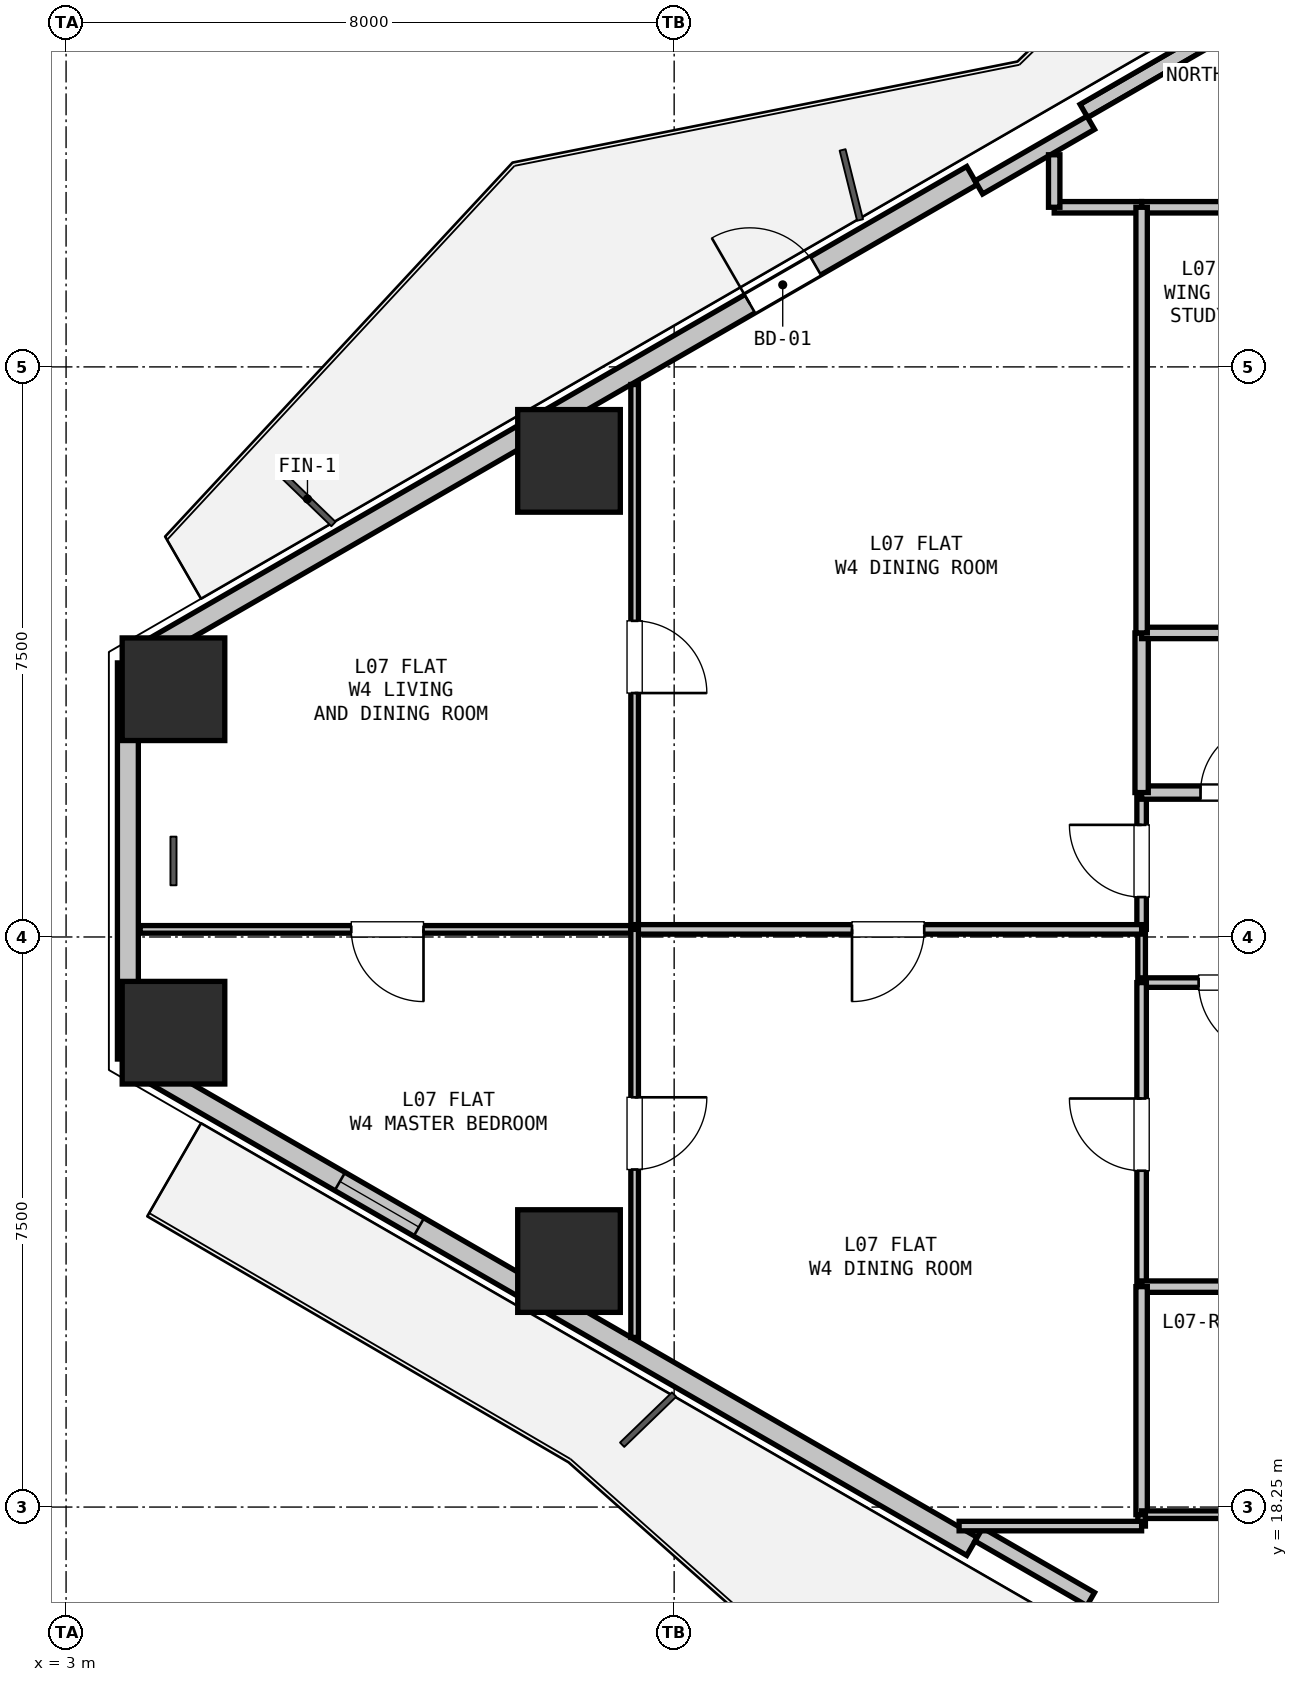
"""IFC4 building model, lengths in metres.
Left out: names, types, materials, properties, quantities, classifications, styles, units other than length and angle.
Written with IfcOpenShell. Run it as: python <this file> out.ifc"""

import sys

from ifc_helpers import new_model, si_unit, direction, frame, frame_2d, origin, origin_2d, place, context, subcontext, project, spatial, rectangle, hollow_rectangle, extrude, element, fill, save


model = new_model("IFC4")
c1 = context("Model", 3, precision=1e-05, world=origin(), true_north=direction((0.0, 1.0)))
c2 = subcontext(c1, "Body", "Model", "MODEL_VIEW")
j1 = project(units=[si_unit("LENGTHUNIT", "METRE"), si_unit("PLANEANGLEUNIT", "RADIAN")], contexts=[c1])
p1 = place(None, origin())
s1 = spatial("IfcSite", under=j1, at=p1, CompositionType="ELEMENT")
p2 = place(p1, origin())
s2 = spatial("IfcBuilding", under=s1, at=p2, CompositionType="ELEMENT")
p3 = place(p2, frame((0.0, 0.0, 29.1)))
s3 = spatial("IfcBuildingStorey", under=s2, at=p3, CompositionType="ELEMENT", Elevation=29.1)
for number, where, z_axis, x_axis in (
    (1, (4.413, 29.009, 0.0), (0.0, 0.0, 1.0), (1.0, 0.0, 0.0)),
    (2, (9.617, 32.014, 0.0), (0.0, 0.0, 1.0), (1.0, 0.0, 0.0)),
    (3, (9.617, 21.486, 0.0), (0.0, 0.0, 1.0), (1.0, 0.0, 0.0)),
    (4, (4.413, 24.491, 0.0), (0.0, 0.0, 1.0), (1.0, 0.0, 0.0)),
):
    element("IfcColumn", number, at=place(p3, frame(where, z_axis=z_axis, x_axis=x_axis)), inside=s3, PredefinedType="COLUMN", context=c2, shape_type="SweptSolid", body=[
        extrude(hollow_rectangle(XDim=1.35, YDim=1.35, WallThickness=0.036, at=origin_2d()), origin(), (0.0, 0.0, 1.0), 3.3),
    ])
p4 = place(p3, frame((3.813, 24.144, 0.0), z_axis=(0.0, 0.0, 1.0), x_axis=(0.0, 1.0, 0.0)))
e5 = element("IfcWall", 5, at=p4, inside=s3, PredefinedType="SOLIDWALL", context=c2, shape_type="SweptSolid", body=[
    extrude(rectangle(XDim=5.211, YDim=0.275, at=frame_2d((2.606, 0.0))), origin(), (0.0, 0.0, 1.0), 2.66),
])
p5 = place(p3, frame((3.943, 29.431, 0.0), z_axis=(0.0, 0.0, 1.0), x_axis=(0.866027105532, 0.499997052475, 0.0)))
e6 = element("IfcWall", 6, at=p5, inside=s3, PredefinedType="SOLIDWALL", context=c2, shape_type="SweptSolid", body=[
    extrude(rectangle(XDim=12.673, YDim=0.275, at=frame_2d((6.336, 0.0))), origin(), (0.0, 0.0, 1.0), 2.66),
])
p6 = place(p5, frame((9.298, 0.0, 0.0)))
e7 = element("IfcOpeningElement", 7, at=p6, cuts=e6, PredefinedType="OPENING", context=c2, shape_type="SweptSolid", body=[
    extrude(rectangle(XDim=1.0, YDim=2.1, at=frame_2d((0.5, 1.05))), frame((0.0, 0.147, 0.0), z_axis=(0.0, -1.0, 0.0), x_axis=(1.0, 0.0, 0.0)), (0.0, 0.0, 1.0), 0.295),
])
p7 = place(p3, frame((16.39, 36.617, 0.0), z_axis=(0.0, 0.0, 1.0), x_axis=(0.866027351828, 0.499996625875, 0.0)))
e8 = element("IfcWall", 8, at=p7, inside=s3, PredefinedType="PARAPET", context=c2, shape_type="SweptSolid", body=[
    extrude(rectangle(XDim=11.973, YDim=0.2, at=frame_2d((5.987, 0.0))), origin(), (0.0, 0.0, 1.0), 0.2),
])
p8 = place(p3, frame((15.008, 35.611, 0.0), z_axis=(0.0, 0.0, 1.0), x_axis=(0.86605165483, 0.499954529098, 0.0)))
e9 = element("IfcWall", 9, at=p8, inside=s3, PredefinedType="PARAPET", context=c2, shape_type="SweptSolid", body=[
    extrude(rectangle(XDim=1.7, YDim=0.2, at=frame_2d((0.85, 0.0))), origin(), (0.0, 0.0, 1.0), 2.66),
])
p9 = place(p3, frame((14.918, 17.733, 0.0), z_axis=(0.0, 0.0, 1.0), x_axis=(-0.866027105532, 0.499997052475, 0.0)))
e10 = element("IfcWall", 10, at=p9, inside=s3, PredefinedType="SOLIDWALL", context=c2, shape_type="SweptSolid", body=[
    extrude(rectangle(XDim=12.673, YDim=0.275, at=frame_2d((6.336, 0.0))), origin(), (0.0, 0.0, 1.0), 2.66),
])
p10 = place(p9, frame((8.402, 0.0, 0.9)))
e11 = element("IfcOpeningElement", 11, at=p10, cuts=e10, PredefinedType="OPENING", context=c2, shape_type="SweptSolid", body=[
    extrude(rectangle(XDim=1.2, YDim=1.4, at=frame_2d((0.6, 0.7))), frame((0.0, 0.147, 0.0), z_axis=(0.0, -1.0, 0.0), x_axis=(1.0, 0.0, 0.0)), (0.0, 0.0, 1.0), 0.295),
])
p11 = place(p3, frame((16.48, 17.039, 0.0), z_axis=(0.0, 0.0, 1.0), x_axis=(-0.86605165483, 0.499954529098, 0.0)))
e12 = element("IfcWall", 12, at=p11, inside=s3, PredefinedType="PARAPET", context=c2, shape_type="SweptSolid", body=[
    extrude(rectangle(XDim=1.7, YDim=0.2, at=frame_2d((0.85, 0.0))), origin(), (0.0, 0.0, 1.0), 2.66),
])
p12 = place(p3, frame((17.15, 25.15, 0.0), z_axis=(0.0, 0.0, 1.0), x_axis=(0.0, 1.0, 0.0)))
e13 = element("IfcWall", 13, at=p12, inside=s3, PredefinedType="PARTITIONING", context=c2, shape_type="SweptSolid", body=[
    extrude(rectangle(XDim=0.7, YDim=0.1, at=frame_2d((0.35, 0.0))), origin(), (0.0, 0.0, 1.0), 3.04),
])
p13 = place(p3, frame((17.15, 25.85, 0.0), z_axis=(0.0, 0.0, 1.0), x_axis=(0.0, 1.0, 0.0)))
e14 = element("IfcWall", 14, at=p13, inside=s3, PredefinedType="PARTITIONING", context=c2, shape_type="SweptSolid", body=[
    extrude(rectangle(XDim=1.8, YDim=0.125, at=frame_2d((0.9, 0.0))), origin(), (0.0, 0.0, 1.0), 3.04),
])
p14 = place(p13, frame((0.425, 0.0, 0.0)))
e15 = element("IfcOpeningElement", 15, at=p14, cuts=e14, PredefinedType="OPENING", context=c2, shape_type="SweptSolid", body=[
    extrude(rectangle(XDim=0.95, YDim=2.1, at=frame_2d((0.475, 1.05))), frame((0.0, 0.073, 0.0), z_axis=(0.0, -1.0, 0.0), x_axis=(1.0, 0.0, 0.0)), (0.0, 0.0, 1.0), 0.145),
])
p15 = place(p3, frame((17.15, 27.65, 0.0), z_axis=(0.0, 0.0, 1.0), x_axis=(1.0, 0.0, 0.0)))
e16 = element("IfcWall", 16, at=p15, inside=s3, PredefinedType="PLUMBINGWALL", context=c2, shape_type="SweptSolid", body=[
    extrude(rectangle(XDim=2.45, YDim=0.175, at=frame_2d((1.225, 0.0))), origin(), (0.0, 0.0, 1.0), 3.04),
])
p16 = place(p15, frame((0.775, 0.0, 0.0)))
e17 = element("IfcOpeningElement", 17, at=p16, cuts=e16, PredefinedType="OPENING", context=c2, shape_type="SweptSolid", body=[
    extrude(rectangle(XDim=0.9, YDim=2.1, at=frame_2d((0.45, 1.05))), frame((0.0, 0.097, 0.0), z_axis=(0.0, -1.0, 0.0), x_axis=(1.0, 0.0, 0.0)), (0.0, 0.0, 1.0), 0.195),
])
p17 = place(p3, frame((19.6, 25.15, 0.0), z_axis=(0.0, 0.0, 1.0), x_axis=(-1.0, 0.0, 0.0)))
e18 = element("IfcWall", 18, at=p17, inside=s3, PredefinedType="PARTITIONING", context=c2, shape_type="SweptSolid", body=[
    extrude(rectangle(XDim=2.45, YDim=0.125, at=frame_2d((1.225, 0.0))), origin(), (0.0, 0.0, 1.0), 3.04),
])
p18 = place(p17, frame((0.75, 0.0, 0.0)))
e19 = element("IfcOpeningElement", 19, at=p18, cuts=e18, PredefinedType="OPENING", context=c2, shape_type="SweptSolid", body=[
    extrude(rectangle(XDim=0.95, YDim=2.1, at=frame_2d((0.475, 1.05))), frame((0.0, 0.073, 0.0), z_axis=(0.0, -1.0, 0.0), x_axis=(1.0, 0.0, 0.0)), (0.0, 0.0, 1.0), 0.145),
])
p19 = place(p3, frame((17.15, 27.65, 0.0), z_axis=(0.0, 0.0, 1.0), x_axis=(0.0, 1.0, 0.0)))
e20 = element("IfcWall", 20, at=p19, inside=s3, PredefinedType="PLUMBINGWALL", context=c2, shape_type="SweptSolid", body=[
    extrude(rectangle(XDim=2.1, YDim=0.175, at=frame_2d((1.05, 0.0))), origin(), (0.0, 0.0, 1.0), 3.04),
])
p20 = place(p3, frame((17.15, 29.75, 0.0), z_axis=(0.0, 0.0, 1.0), x_axis=(1.0, 0.0, 0.0)))
e21 = element("IfcWall", 21, at=p20, inside=s3, PredefinedType="PARTITIONING", context=c2, shape_type="SweptSolid", body=[
    extrude(rectangle(XDim=2.45, YDim=0.15, at=frame_2d((1.225, 0.0))), origin(), (0.0, 0.0, 1.0), 3.04),
])
p21 = place(p3, frame((17.15, 21.15, 0.0), z_axis=(0.0, 0.0, 1.0), x_axis=(0.0, 1.0, 0.0)))
e22 = element("IfcWall", 22, at=p21, inside=s3, PredefinedType="PARTITIONING", context=c2, shape_type="SweptSolid", body=[
    extrude(rectangle(XDim=4.0, YDim=0.125, at=frame_2d((2.0, 0.0))), origin(), (0.0, 0.0, 1.0), 2.337),
])
p22 = place(p21, frame((1.525, 0.0, 0.0)))
e23 = element("IfcOpeningElement", 23, at=p22, cuts=e22, PredefinedType="OPENING", context=c2, shape_type="SweptSolid", body=[
    extrude(rectangle(XDim=0.95, YDim=2.1, at=frame_2d((0.475, 1.05))), frame((0.0, 0.073, 0.0), z_axis=(0.0, -1.0, 0.0), x_axis=(1.0, 0.0, 0.0)), (0.0, 0.0, 1.0), 0.145),
])
p23 = place(p3, frame((19.6, 21.15, 0.0), z_axis=(0.0, 0.0, 1.0), x_axis=(-1.0, 0.0, 0.0)))
e24 = element("IfcWall", 24, at=p23, inside=s3, PredefinedType="PARTITIONING", context=c2, shape_type="SweptSolid", body=[
    extrude(rectangle(XDim=2.45, YDim=0.15, at=frame_2d((1.225, 0.0))), origin(), (0.0, 0.0, 1.0), 2.337),
])
p24 = place(p3, frame((19.6, 35.35, 0.0), z_axis=(0.0, 0.0, 1.0), x_axis=(-1.0, 0.0, 0.0)))
e25 = element("IfcWall", 25, at=p24, inside=s3, PredefinedType="PARTITIONING", context=c2, shape_type="SweptSolid", body=[
    extrude(rectangle(XDim=2.45, YDim=0.15, at=frame_2d((1.225, 0.0))), origin(), (0.0, 0.0, 1.0), 3.04),
])
p25 = place(p3, frame((17.15, 35.35, 0.0), z_axis=(0.0, 0.0, 1.0), x_axis=(-1.0, 0.0, 0.0)))
e26 = element("IfcWall", 26, at=p25, inside=s3, PredefinedType="PARTITIONING", context=c2, shape_type="SweptSolid", body=[
    extrude(rectangle(XDim=1.15, YDim=0.15, at=frame_2d((0.575, 0.0))), origin(), (0.0, 0.0, 1.0), 3.04),
])
p26 = place(p3, frame((16.0, 35.35, 0.0), z_axis=(0.0, 0.0, 1.0), x_axis=(0.0, 1.0, 0.0)))
e27 = element("IfcWall", 27, at=p26, inside=s3, PredefinedType="PARTITIONING", context=c2, shape_type="SweptSolid", body=[
    extrude(rectangle(XDim=0.691, YDim=0.15, at=frame_2d((0.345, 0.0))), origin(), (0.0, 0.0, 1.0), 2.365),
])
p27 = place(p3, frame((17.15, 29.75, 0.0), z_axis=(0.0, 0.0, 1.0), x_axis=(0.0, 1.0, 0.0)))
e28 = element("IfcWall", 28, at=p27, inside=s3, PredefinedType="PARTITIONING", context=c2, shape_type="SweptSolid", body=[
    extrude(rectangle(XDim=5.6, YDim=0.15, at=frame_2d((2.8, 0.0))), origin(), (0.0, 0.0, 1.0), 2.337),
])
p28 = place(p3, frame((17.15, 18.15, 0.0), z_axis=(0.0, 0.0, 1.0), x_axis=(0.0, 1.0, 0.0)))
e29 = element("IfcWall", 29, at=p28, inside=s3, PredefinedType="PARTITIONING", context=c2, shape_type="SweptSolid", body=[
    extrude(rectangle(XDim=3.0, YDim=0.15, at=frame_2d((1.5, 0.0))), origin(), (0.0, 0.0, 1.0), 3.04),
])
p29 = place(p3, frame((19.6, 18.15, 0.0), z_axis=(0.0, 0.0, 1.0), x_axis=(-1.0, 0.0, 0.0)))
e30 = element("IfcWall", 30, at=p29, inside=s3, PredefinedType="PARTITIONING", context=c2, shape_type="SweptSolid", body=[
    extrude(rectangle(XDim=2.45, YDim=0.1, at=frame_2d((1.225, 0.0))), origin(), (0.0, 0.0, 1.0), 3.04),
])
p30 = place(p3, frame((10.48, 25.85, 0.0), z_axis=(0.0, 0.0, 1.0), x_axis=(-1.0, 0.0, 0.0)))
e31 = element("IfcWall", 31, at=p30, inside=s3, PredefinedType="PARTITIONING", context=c2, shape_type="SweptSolid", body=[
    extrude(rectangle(XDim=6.505, YDim=0.1, at=frame_2d((3.253, 0.0))), origin(), (0.0, 0.0, 1.0), 2.65),
])
p31 = place(p30, frame((2.778, 0.0, 0.0)))
e32 = element("IfcOpeningElement", 32, at=p31, cuts=e31, PredefinedType="OPENING", context=c2, shape_type="SweptSolid", body=[
    extrude(rectangle(XDim=0.95, YDim=2.1, at=frame_2d((0.475, 1.05))), frame((0.0, 0.06, 0.0), z_axis=(0.0, -1.0, 0.0), x_axis=(1.0, 0.0, 0.0)), (0.0, 0.0, 1.0), 0.12),
])
p32 = place(p3, frame((3.813, 29.356, 0.0), z_axis=(0.0, 0.0, 1.0), x_axis=(0.866131372301, 0.499816412211, 0.0)))
e33 = element("IfcWall", 33, at=p32, inside=s3, PredefinedType="PARTITIONING", context=c2, shape_type="SweptSolid", body=[
    extrude(rectangle(XDim=0.15, YDim=0.125, at=frame_2d((0.075, 0.0))), origin(), (0.0, 0.0, 1.0), 3.04),
])
p33 = place(p3, frame((10.48, 33.018, 0.0), z_axis=(0.0, 0.0, 1.0), x_axis=(0.0, -1.0, 0.0)))
e34 = element("IfcWall", 34, at=p33, inside=s3, PredefinedType="PARTITIONING", context=c2, shape_type="SweptSolid", body=[
    extrude(rectangle(XDim=7.168, YDim=0.1, at=frame_2d((3.584, 0.0))), origin(), (0.0, 0.0, 1.0), 2.337),
])
p34 = place(p33, frame((3.109, 0.0, 0.0)))
e35 = element("IfcOpeningElement", 35, at=p34, cuts=e34, PredefinedType="OPENING", context=c2, shape_type="SweptSolid", body=[
    extrude(rectangle(XDim=0.95, YDim=2.1, at=frame_2d((0.475, 1.05))), frame((0.0, 0.06, 0.0), z_axis=(0.0, -1.0, 0.0), x_axis=(1.0, 0.0, 0.0)), (0.0, 0.0, 1.0), 0.12),
])
p35 = place(p3, frame((17.15, 25.85, 0.0), z_axis=(0.0, 0.0, 1.0), x_axis=(-1.0, 0.0, 0.0)))
e36 = element("IfcWall", 36, at=p35, inside=s3, PredefinedType="PARTITIONING", context=c2, shape_type="SweptSolid", body=[
    extrude(rectangle(XDim=6.67, YDim=0.125, at=frame_2d((3.335, 0.0))), origin(), (0.0, 0.0, 1.0), 3.04),
])
p36 = place(p35, frame((2.86, 0.0, 0.0)))
e37 = element("IfcOpeningElement", 37, at=p36, cuts=e36, PredefinedType="OPENING", context=c2, shape_type="SweptSolid", body=[
    extrude(rectangle(XDim=0.95, YDim=2.1, at=frame_2d((0.475, 1.05))), frame((0.0, 0.073, 0.0), z_axis=(0.0, -1.0, 0.0), x_axis=(1.0, 0.0, 0.0)), (0.0, 0.0, 1.0), 0.145),
])
p37 = place(p3, frame((10.48, 25.85, 0.0), z_axis=(0.0, 0.0, 1.0), x_axis=(0.0, -1.0, 0.0)))
e38 = element("IfcWall", 38, at=p37, inside=s3, PredefinedType="PARTITIONING", context=c2, shape_type="SweptSolid", body=[
    extrude(rectangle(XDim=5.368, YDim=0.1, at=frame_2d((2.684, 0.0))), origin(), (0.0, 0.0, 1.0), 2.337),
])
p38 = place(p37, frame((2.209, 0.0, 0.0)))
e39 = element("IfcOpeningElement", 39, at=p38, cuts=e38, PredefinedType="OPENING", context=c2, shape_type="SweptSolid", body=[
    extrude(rectangle(XDim=0.95, YDim=2.1, at=frame_2d((0.475, 1.05))), frame((0.0, 0.06, 0.0), z_axis=(0.0, -1.0, 0.0), x_axis=(1.0, 0.0, 0.0)), (0.0, 0.0, 1.0), 0.12),
])
p39 = place(p3, frame((3.943, 24.069, 0.0), z_axis=(0.0, 0.0, 1.0), x_axis=(-0.866131372301, 0.499816412211, 0.0)))
e40 = element("IfcWall", 40, at=p39, inside=s3, PredefinedType="PARTITIONING", context=c2, shape_type="SweptSolid", body=[
    extrude(rectangle(XDim=0.15, YDim=0.125, at=frame_2d((0.075, 0.0))), origin(), (0.0, 0.0, 1.0), 3.04),
])
p40 = place(p3, frame((17.15, 18.15, 0.0), z_axis=(0.0, 0.0, 1.0), x_axis=(0.0, -1.0, 0.0)))
e41 = element("IfcWall", 41, at=p40, inside=s3, PredefinedType="PARTITIONING", context=c2, shape_type="SweptSolid", body=[
    extrude(rectangle(XDim=0.15, YDim=0.1, at=frame_2d((0.075, 0.0))), origin(), (0.0, 0.0, 1.0), 3.04),
])
p41 = place(p3, frame((17.15, 18.0, 0.0), z_axis=(0.0, 0.0, 1.0), x_axis=(-1.0, 0.0, 0.0)))
e42 = element("IfcWall", 42, at=p41, inside=s3, PredefinedType="PARTITIONING", context=c2, shape_type="SweptSolid", body=[
    extrude(rectangle(XDim=2.401, YDim=0.125, at=frame_2d((1.2, 0.0))), origin(), (0.0, 0.0, 1.0), 2.365),
])
p42 = place(p6, origin())
e43 = element("IfcDoor", 43, at=p42, inside=s3, OperationType="SINGLE_SWING_LEFT", PredefinedType="DOOR", context=c2, shape_type="SweptSolid", body=[
    extrude(rectangle(XDim=1.0, YDim=2.1, at=frame_2d((0.5, 1.05))), frame((0.0, 0.025, 0.0), z_axis=(0.0, -1.0, 0.0), x_axis=(1.0, 0.0, 0.0)), (0.0, 0.0, 1.0), 0.05),
])
fill(e7, e43)
p43 = place(p10, origin())
e44 = element("IfcWindow", 44, at=p43, inside=s3, PartitioningType="SINGLE_PANEL", PredefinedType="WINDOW", context=c2, shape_type="SweptSolid", body=[
    extrude(rectangle(XDim=1.2, YDim=1.4, at=frame_2d((0.6, 0.7))), frame((0.0, 0.03, 0.0), z_axis=(0.0, -1.0, 0.0), x_axis=(1.0, 0.0, 0.0)), (0.0, 0.0, 1.0), 0.06),
])
fill(e11, e44)
p44 = place(p16, origin())
e45 = element("IfcDoor", 45, at=p44, inside=s3, OperationType="SINGLE_SWING_RIGHT", PredefinedType="DOOR", context=c2, shape_type="SweptSolid", body=[
    extrude(rectangle(XDim=0.9, YDim=2.1, at=frame_2d((0.45, 1.05))), frame((0.0, 0.025, 0.0), z_axis=(0.0, -1.0, 0.0), x_axis=(1.0, 0.0, 0.0)), (0.0, 0.0, 1.0), 0.05),
])
fill(e17, e45)
p45 = place(p18, origin())
e46 = element("IfcDoor", 46, at=p45, inside=s3, OperationType="SINGLE_SWING_LEFT", PredefinedType="DOOR", context=c2, shape_type="SweptSolid", body=[
    extrude(rectangle(XDim=0.95, YDim=2.1, at=frame_2d((0.475, 1.05))), frame((0.0, 0.025, 0.0), z_axis=(0.0, -1.0, 0.0), x_axis=(1.0, 0.0, 0.0)), (0.0, 0.0, 1.0), 0.05),
])
fill(e19, e46)
p46 = place(p14, origin())
e47 = element("IfcDoor", 47, at=p46, inside=s3, OperationType="SINGLE_SWING_RIGHT", PredefinedType="DOOR", context=c2, shape_type="SweptSolid", body=[
    extrude(rectangle(XDim=0.95, YDim=2.1, at=frame_2d((0.475, 1.05))), frame((0.0, 0.025, 0.0), z_axis=(0.0, -1.0, 0.0), x_axis=(1.0, 0.0, 0.0)), (0.0, 0.0, 1.0), 0.05),
])
fill(e15, e47)
p47 = place(p22, origin())
e48 = element("IfcDoor", 48, at=p47, inside=s3, OperationType="SINGLE_SWING_RIGHT", PredefinedType="DOOR", context=c2, shape_type="SweptSolid", body=[
    extrude(rectangle(XDim=0.95, YDim=2.1, at=frame_2d((0.475, 1.05))), frame((0.0, 0.025, 0.0), z_axis=(0.0, -1.0, 0.0), x_axis=(1.0, 0.0, 0.0)), (0.0, 0.0, 1.0), 0.05),
])
fill(e23, e48)
p48 = place(p34, origin())
e49 = element("IfcDoor", 49, at=p48, inside=s3, OperationType="SINGLE_SWING_RIGHT", PredefinedType="DOOR", context=c2, shape_type="SweptSolid", body=[
    extrude(rectangle(XDim=0.95, YDim=2.1, at=frame_2d((0.475, 1.05))), frame((0.0, 0.025, 0.0), z_axis=(0.0, -1.0, 0.0), x_axis=(1.0, 0.0, 0.0)), (0.0, 0.0, 1.0), 0.05),
])
fill(e35, e49)
p49 = place(p31, origin())
e50 = element("IfcDoor", 50, at=p49, inside=s3, OperationType="SINGLE_SWING_LEFT", PredefinedType="DOOR", context=c2, shape_type="SweptSolid", body=[
    extrude(rectangle(XDim=0.95, YDim=2.1, at=frame_2d((0.475, 1.05))), frame((0.0, 0.025, 0.0), z_axis=(0.0, -1.0, 0.0), x_axis=(1.0, 0.0, 0.0)), (0.0, 0.0, 1.0), 0.05),
])
fill(e32, e50)
p50 = place(p36, origin())
e51 = element("IfcDoor", 51, at=p50, inside=s3, OperationType="SINGLE_SWING_RIGHT", PredefinedType="DOOR", context=c2, shape_type="SweptSolid", body=[
    extrude(rectangle(XDim=0.95, YDim=2.1, at=frame_2d((0.475, 1.05))), frame((0.0, 0.025, 0.0), z_axis=(0.0, -1.0, 0.0), x_axis=(1.0, 0.0, 0.0)), (0.0, 0.0, 1.0), 0.05),
])
fill(e37, e51)
p51 = place(p38, origin())
e52 = element("IfcDoor", 52, at=p51, inside=s3, OperationType="SINGLE_SWING_LEFT", PredefinedType="DOOR", context=c2, shape_type="SweptSolid", body=[
    extrude(rectangle(XDim=0.95, YDim=2.1, at=frame_2d((0.475, 1.05))), frame((0.0, 0.025, 0.0), z_axis=(0.0, -1.0, 0.0), x_axis=(1.0, 0.0, 0.0)), (0.0, 0.0, 1.0), 0.05),
])
fill(e39, e52)
save(model, sys.argv[1])
